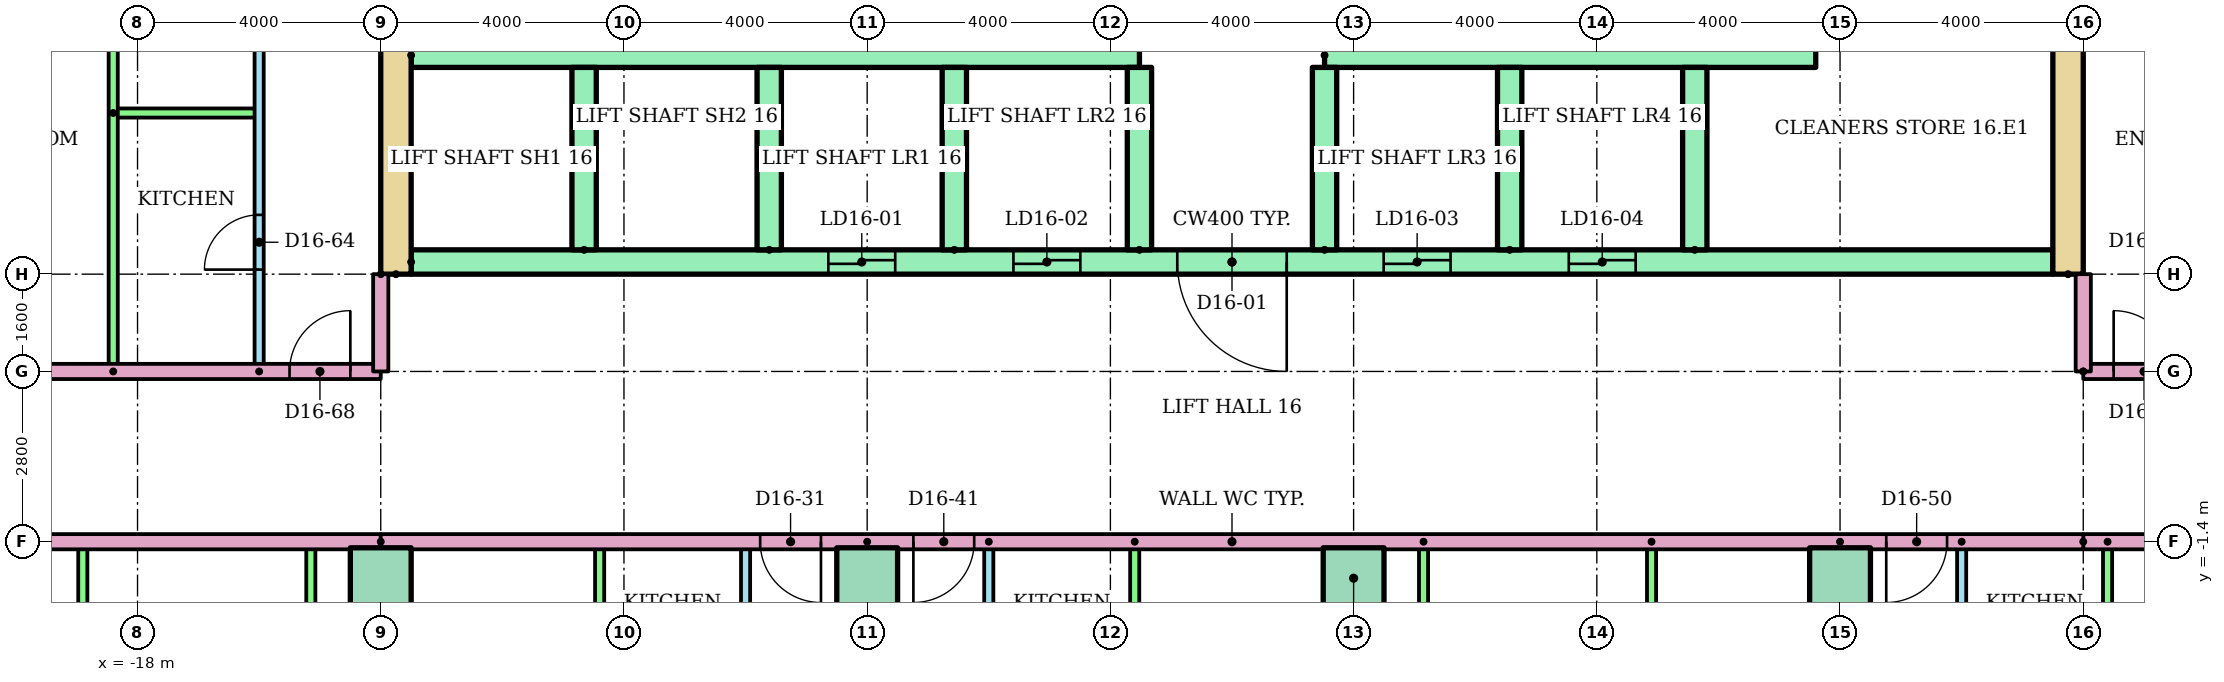
"""IFC4 building model, lengths in metres.
Left out: names, types, materials, properties, quantities, classifications, styles, units other than length and angle.
Written with IfcOpenShell. Run it as: python <this file> out.ifc"""

import sys

from ifc_helpers import new_model, si_unit, direction, frame, frame_2d, origin, origin_2d, place, context, subcontext, project, spatial, rectangle, extrude, element, fill, save


model = new_model("IFC4")
c1 = context("Model", 3, precision=1e-05, world=origin(), true_north=direction((0.0, 1.0)))
c2 = subcontext(c1, "Body", "Model", "MODEL_VIEW")
j1 = project(units=[si_unit("LENGTHUNIT", "METRE"), si_unit("PLANEANGLEUNIT", "RADIAN")], contexts=[c1])
p1 = place(None, origin())
s1 = spatial("IfcSite", under=j1, at=p1, CompositionType="ELEMENT")
p2 = place(p1, origin())
s2 = spatial("IfcBuilding", under=s1, at=p2, CompositionType="ELEMENT")
p3 = place(p2, frame((0.0, 0.0, 60.8)))
s3 = spatial("IfcBuildingStorey", under=s2, at=p3, CompositionType="ELEMENT", Elevation=60.8)
for number, where in (
    (1, (-14.0, -2.0, 0.0)),
    (2, (-6.0, -2.0, 0.0)),
    (3, (2.0, -2.0, 0.0)),
    (4, (10.0, -2.0, 0.0)),
):
    element("IfcColumn", number, at=place(p3, frame(where)), inside=s3, PredefinedType="COLUMN", context=c2, shape_type="SweptSolid", body=[
        extrude(rectangle(XDim=1.0, YDim=1.0, at=origin_2d()), origin(), (0.0, 0.0, 1.0), 3.2),
    ])
for number, where, z_axis, x_axis in (
    (5, (-13.75, 3.0, 0.0), (0.0, 0.0, 1.0), (0.0, 1.0, 0.0)),
    (6, (13.75, 3.0, 0.0), (0.0, 0.0, 1.0), (0.0, 1.0, 0.0)),
):
    element("IfcWall", number, at=place(p3, frame(where, z_axis=z_axis, x_axis=x_axis)), inside=s3, PredefinedType="SHEAR", context=c2, shape_type="SweptSolid", body=[
        extrude(rectangle(XDim=17.0, YDim=0.5, at=frame_2d((8.5, 0.0))), origin(), (0.0, 0.0, 1.0), 2.8),
    ])
p4 = place(p3, frame((-13.5, 3.2, 0.0)))
e7 = element("IfcWall", 7, at=p4, inside=s3, PredefinedType="SHEAR", context=c2, shape_type="SweptSolid", body=[
    extrude(rectangle(XDim=27.0, YDim=0.4, at=frame_2d((13.5, 0.0))), origin(), (0.0, 0.0, 1.0), 2.8),
])
p5 = place(p4, frame((6.861, 0.0, 0.0)))
e8 = element("IfcOpeningElement", 8, at=p5, cuts=e7, PredefinedType="OPENING", context=c2, shape_type="SweptSolid", body=[
    extrude(rectangle(XDim=1.1, YDim=2.1, at=frame_2d((0.55, 1.05))), frame((0.0, 0.21, 0.0), z_axis=(0.0, -1.0, 0.0), x_axis=(1.0, 0.0, 0.0)), (0.0, 0.0, 1.0), 0.42),
])
p6 = place(p4, frame((9.906, 0.0, 0.0)))
e9 = element("IfcOpeningElement", 9, at=p6, cuts=e7, PredefinedType="OPENING", context=c2, shape_type="SweptSolid", body=[
    extrude(rectangle(XDim=1.1, YDim=2.1, at=frame_2d((0.55, 1.05))), frame((0.0, 0.21, 0.0), z_axis=(0.0, -1.0, 0.0), x_axis=(1.0, 0.0, 0.0)), (0.0, 0.0, 1.0), 0.42),
])
p7 = place(p4, frame((15.994, 0.0, 0.0)))
e10 = element("IfcOpeningElement", 10, at=p7, cuts=e7, PredefinedType="OPENING", context=c2, shape_type="SweptSolid", body=[
    extrude(rectangle(XDim=1.1, YDim=2.1, at=frame_2d((0.55, 1.05))), frame((0.0, 0.21, 0.0), z_axis=(0.0, -1.0, 0.0), x_axis=(1.0, 0.0, 0.0)), (0.0, 0.0, 1.0), 0.42),
])
p8 = place(p4, frame((19.039, 0.0, 0.0)))
e11 = element("IfcOpeningElement", 11, at=p8, cuts=e7, PredefinedType="OPENING", context=c2, shape_type="SweptSolid", body=[
    extrude(rectangle(XDim=1.1, YDim=2.1, at=frame_2d((0.55, 1.05))), frame((0.0, 0.21, 0.0), z_axis=(0.0, -1.0, 0.0), x_axis=(1.0, 0.0, 0.0)), (0.0, 0.0, 1.0), 0.42),
])
p9 = place(p4, frame((12.6, 0.0, 0.0)))
e12 = element("IfcOpeningElement", 12, at=p9, cuts=e7, PredefinedType="OPENING", context=c2, shape_type="SweptSolid", body=[
    extrude(rectangle(XDim=1.8, YDim=2.1, at=frame_2d((0.9, 1.05))), frame((0.0, 0.21, 0.0), z_axis=(0.0, -1.0, 0.0), x_axis=(1.0, 0.0, 0.0)), (0.0, 0.0, 1.0), 0.42),
])
p10 = place(p3, frame((-13.5, 6.6, 0.0)))
e13 = element("IfcWall", 13, at=p10, inside=s3, PredefinedType="SHEAR", context=c2, shape_type="SweptSolid", body=[
    extrude(rectangle(XDim=11.978, YDim=0.4, at=frame_2d((5.989, 0.0))), origin(), (0.0, 0.0, 1.0), 2.8),
])
p11 = place(p3, frame((1.522, 6.6, 0.0)))
e14 = element("IfcWall", 14, at=p11, inside=s3, PredefinedType="SHEAR", context=c2, shape_type="SweptSolid", body=[
    extrude(rectangle(XDim=8.078, YDim=0.4, at=frame_2d((4.039, 0.0))), origin(), (0.0, 0.0, 1.0), 2.8),
])
for number, where, z_axis, x_axis in (
    (15, (-10.656, 3.4, 0.0), (0.0, 0.0, 1.0), (0.0, 1.0, 0.0)),
    (16, (-7.611, 3.4, 0.0), (0.0, 0.0, 1.0), (0.0, 1.0, 0.0)),
    (17, (-4.567, 3.4, 0.0), (0.0, 0.0, 1.0), (0.0, 1.0, 0.0)),
    (18, (-1.522, 3.4, 0.0), (0.0, 0.0, 1.0), (0.0, 1.0, 0.0)),
    (19, (1.522, 3.4, 0.0), (0.0, 0.0, 1.0), (0.0, 1.0, 0.0)),
    (20, (4.567, 3.4, 0.0), (0.0, 0.0, 1.0), (0.0, 1.0, 0.0)),
    (21, (7.611, 3.4, 0.0), (0.0, 0.0, 1.0), (0.0, 1.0, 0.0)),
):
    element("IfcWall", number, at=place(p3, frame(where, z_axis=z_axis, x_axis=x_axis)), inside=s3, PredefinedType="SHEAR", context=c2, shape_type="SweptSolid", body=[
        extrude(rectangle(XDim=3.0, YDim=0.4, at=frame_2d((1.5, 0.0))), origin(), (0.0, 0.0, 1.0), 2.8),
    ])
p12 = place(p3, frame((-8.0, -6.6, 0.0), z_axis=(0.0, 0.0, 1.0), x_axis=(0.0, 1.0, 0.0)))
e22 = element("IfcWall", 22, at=p12, inside=s3, PredefinedType="PARTITIONING", context=c2, shape_type="SweptSolid", body=[
    extrude(rectangle(XDim=5.2, YDim=0.15, at=frame_2d((2.6, 0.0))), origin(), (0.0, 0.0, 1.0), 2.4),
])
p13 = place(p12, frame((2.94, 0.0, 0.0)))
e23 = element("IfcOpeningElement", 23, at=p13, cuts=e22, PredefinedType="OPENING", context=c2, shape_type="SweptSolid", body=[
    extrude(rectangle(XDim=0.9, YDim=2.1, at=frame_2d((0.45, 1.05))), frame((0.0, 0.085, 0.0), z_axis=(0.0, -1.0, 0.0), x_axis=(1.0, 0.0, 0.0)), (0.0, 0.0, 1.0), 0.17),
])
p14 = place(p12, frame((0.825, 0.0, 0.0)))
e24 = element("IfcOpeningElement", 24, at=p14, cuts=e22, PredefinedType="OPENING", context=c2, shape_type="SweptSolid", body=[
    extrude(rectangle(XDim=0.8, YDim=2.1, at=frame_2d((0.4, 1.05))), frame((0.0, 0.085, 0.0), z_axis=(0.0, -1.0, 0.0), x_axis=(1.0, 0.0, 0.0)), (0.0, 0.0, 1.0), 0.17),
])
for number, where, z_axis, x_axis in (
    (25, (-10.4, -6.6, 0.0), (0.0, 0.0, 1.0), (0.0, 1.0, 0.0)),
    (26, (-15.15, -6.6, 0.0), (0.0, 0.0, 1.0), (0.0, 1.0, 0.0)),
    (27, (-18.9, -6.6, 0.0), (0.0, 0.0, 1.0), (0.0, 1.0, 0.0)),
):
    element("IfcWall", number, at=place(p3, frame(where, z_axis=z_axis, x_axis=x_axis)), inside=s3, PredefinedType="PARTITIONING", context=c2, shape_type="SweptSolid", body=[
        extrude(rectangle(XDim=5.2, YDim=0.15, at=frame_2d((2.6, 0.0))), origin(), (0.0, 0.0, 1.0), 2.4),
    ])
p15 = place(p3, frame((-4.0, -1.4, 0.0), z_axis=(0.0, 0.0, 1.0), x_axis=(0.0, -1.0, 0.0)))
e28 = element("IfcWall", 28, at=p15, inside=s3, PredefinedType="PARTITIONING", context=c2, shape_type="SweptSolid", body=[
    extrude(rectangle(XDim=5.2, YDim=0.15, at=frame_2d((2.6, 0.0))), origin(), (0.0, 0.0, 1.0), 2.4),
])
p16 = place(p15, frame((1.36, 0.0, 0.0)))
e29 = element("IfcOpeningElement", 29, at=p16, cuts=e28, PredefinedType="OPENING", context=c2, shape_type="SweptSolid", body=[
    extrude(rectangle(XDim=0.9, YDim=2.1, at=frame_2d((0.45, 1.05))), frame((0.0, 0.085, 0.0), z_axis=(0.0, -1.0, 0.0), x_axis=(1.0, 0.0, 0.0)), (0.0, 0.0, 1.0), 0.17),
])
p17 = place(p15, frame((3.575, 0.0, 0.0)))
e30 = element("IfcOpeningElement", 30, at=p17, cuts=e28, PredefinedType="OPENING", context=c2, shape_type="SweptSolid", body=[
    extrude(rectangle(XDim=0.8, YDim=2.1, at=frame_2d((0.4, 1.05))), frame((0.0, 0.085, 0.0), z_axis=(0.0, -1.0, 0.0), x_axis=(1.0, 0.0, 0.0)), (0.0, 0.0, 1.0), 0.17),
])
for number, where, z_axis, x_axis in (
    (31, (-1.6, -1.4, 0.0), (0.0, 0.0, 1.0), (0.0, -1.0, 0.0)),
    (32, (3.15, -1.4, 0.0), (0.0, 0.0, 1.0), (0.0, -1.0, 0.0)),
    (33, (6.9, -1.4, 0.0), (0.0, 0.0, 1.0), (0.0, -1.0, 0.0)),
):
    element("IfcWall", number, at=place(p3, frame(where, z_axis=z_axis, x_axis=x_axis)), inside=s3, PredefinedType="PARTITIONING", context=c2, shape_type="SweptSolid", body=[
        extrude(rectangle(XDim=5.2, YDim=0.15, at=frame_2d((2.6, 0.0))), origin(), (0.0, 0.0, 1.0), 2.4),
    ])
p18 = place(p3, frame((-6.0, -1.4, 0.0), z_axis=(0.0, 0.0, 1.0), x_axis=(0.0, -1.0, 0.0)))
e34 = element("IfcWall", 34, at=p18, inside=s3, PredefinedType="PARTITIONING", context=c2, shape_type="SweptSolid", body=[
    extrude(rectangle(XDim=14.71, YDim=0.25, at=frame_2d((7.355, 0.0))), origin(), (0.0, 0.0, 1.0), 2.4),
])
p19 = place(p3, frame((12.0, -1.4, 0.0), z_axis=(0.0, 0.0, 1.0), x_axis=(0.0, -1.0, 0.0)))
e35 = element("IfcWall", 35, at=p19, inside=s3, PredefinedType="PARTITIONING", context=c2, shape_type="SweptSolid", body=[
    extrude(rectangle(XDim=5.2, YDim=0.15, at=frame_2d((2.6, 0.0))), origin(), (0.0, 0.0, 1.0), 2.4),
])
p20 = place(p19, frame((1.36, 0.0, 0.0)))
e36 = element("IfcOpeningElement", 36, at=p20, cuts=e35, PredefinedType="OPENING", context=c2, shape_type="SweptSolid", body=[
    extrude(rectangle(XDim=0.9, YDim=2.1, at=frame_2d((0.45, 1.05))), frame((0.0, 0.085, 0.0), z_axis=(0.0, -1.0, 0.0), x_axis=(1.0, 0.0, 0.0)), (0.0, 0.0, 1.0), 0.17),
])
p21 = place(p19, frame((3.575, 0.0, 0.0)))
e37 = element("IfcOpeningElement", 37, at=p21, cuts=e35, PredefinedType="OPENING", context=c2, shape_type="SweptSolid", body=[
    extrude(rectangle(XDim=0.8, YDim=2.1, at=frame_2d((0.4, 1.05))), frame((0.0, 0.085, 0.0), z_axis=(0.0, -1.0, 0.0), x_axis=(1.0, 0.0, 0.0)), (0.0, 0.0, 1.0), 0.17),
])
p22 = place(p3, frame((14.4, -1.4, 0.0), z_axis=(0.0, 0.0, 1.0), x_axis=(0.0, -1.0, 0.0)))
e38 = element("IfcWall", 38, at=p22, inside=s3, PredefinedType="PARTITIONING", context=c2, shape_type="SweptSolid", body=[
    extrude(rectangle(XDim=5.2, YDim=0.15, at=frame_2d((2.6, 0.0))), origin(), (0.0, 0.0, 1.0), 2.4),
])
p23 = place(p3, frame((10.0, -1.4, 0.0), z_axis=(0.0, 0.0, 1.0), x_axis=(0.0, -1.0, 0.0)))
e39 = element("IfcWall", 39, at=p23, inside=s3, PredefinedType="PARTITIONING", context=c2, shape_type="SweptSolid", body=[
    extrude(rectangle(XDim=14.71, YDim=0.25, at=frame_2d((7.355, 0.0))), origin(), (0.0, 0.0, 1.0), 2.4),
])
p24 = place(p3, frame((-14.0, -1.4, 0.0), z_axis=(0.0, 0.0, 1.0), x_axis=(-1.0, 0.0, 0.0)))
e40 = element("IfcWall", 40, at=p24, inside=s3, PredefinedType="PARTITIONING", context=c2, shape_type="SweptSolid", body=[
    extrude(rectangle(XDim=15.0, YDim=0.25, at=frame_2d((7.5, 0.0))), origin(), (0.0, 0.0, 1.0), 2.4),
])
p25 = place(p24, frame((8.76, 0.0, 0.0)))
e41 = element("IfcOpeningElement", 41, at=p25, cuts=e40, PredefinedType="OPENING", context=c2, shape_type="SweptSolid", body=[
    extrude(rectangle(XDim=1.0, YDim=2.1, at=frame_2d((0.5, 1.05))), frame((0.0, 0.135, 0.0), z_axis=(0.0, -1.0, 0.0), x_axis=(1.0, 0.0, 0.0)), (0.0, 0.0, 1.0), 0.27),
])
p26 = place(p3, frame((29.0, -1.4, 0.0), z_axis=(0.0, 0.0, 1.0), x_axis=(-1.0, 0.0, 0.0)))
e42 = element("IfcWall", 42, at=p26, inside=s3, PredefinedType="PARTITIONING", context=c2, shape_type="SweptSolid", body=[
    extrude(rectangle(XDim=15.0, YDim=0.25, at=frame_2d((7.5, 0.0))), origin(), (0.0, 0.0, 1.0), 2.4),
])
p27 = place(p26, frame((1.24, 0.0, 0.0)))
e43 = element("IfcOpeningElement", 43, at=p27, cuts=e42, PredefinedType="OPENING", context=c2, shape_type="SweptSolid", body=[
    extrude(rectangle(XDim=1.0, YDim=2.1, at=frame_2d((0.5, 1.05))), frame((0.0, 0.135, 0.0), z_axis=(0.0, -1.0, 0.0), x_axis=(1.0, 0.0, 0.0)), (0.0, 0.0, 1.0), 0.27),
])
p28 = place(p3, frame((-16.0, 1.4, 0.0), z_axis=(0.0, 0.0, 1.0), x_axis=(0.0, 1.0, 0.0)))
e44 = element("IfcWall", 44, at=p28, inside=s3, PredefinedType="PARTITIONING", context=c2, shape_type="SweptSolid", body=[
    extrude(rectangle(XDim=7.6, YDim=0.15, at=frame_2d((3.8, 0.0))), origin(), (0.0, 0.0, 1.0), 2.4),
])
p29 = place(p28, frame((1.675, 0.0, 0.0)))
e45 = element("IfcOpeningElement", 45, at=p29, cuts=e44, PredefinedType="OPENING", context=c2, shape_type="SweptSolid", body=[
    extrude(rectangle(XDim=0.9, YDim=2.1, at=frame_2d((0.45, 1.05))), frame((0.0, 0.085, 0.0), z_axis=(0.0, -1.0, 0.0), x_axis=(1.0, 0.0, 0.0)), (0.0, 0.0, 1.0), 0.17),
])
p30 = place(p28, frame((5.525, 0.0, 0.0)))
e46 = element("IfcOpeningElement", 46, at=p30, cuts=e44, PredefinedType="OPENING", context=c2, shape_type="SweptSolid", body=[
    extrude(rectangle(XDim=0.8, YDim=2.1, at=frame_2d((0.4, 1.05))), frame((0.0, 0.085, 0.0), z_axis=(0.0, -1.0, 0.0), x_axis=(1.0, 0.0, 0.0)), (0.0, 0.0, 1.0), 0.17),
])
p31 = place(p3, frame((-18.4, 5.65, 0.0)))
e47 = element("IfcWall", 47, at=p31, inside=s3, PredefinedType="PARTITIONING", context=c2, shape_type="SweptSolid", body=[
    extrude(rectangle(XDim=2.4, YDim=0.15, at=frame_2d((1.2, 0.0))), origin(), (0.0, 0.0, 1.0), 2.4),
])
p32 = place(p3, frame((-18.4, 1.4, 0.0), z_axis=(0.0, 0.0, 1.0), x_axis=(0.0, 1.0, 0.0)))
e48 = element("IfcWall", 48, at=p32, inside=s3, PredefinedType="PARTITIONING", context=c2, shape_type="SweptSolid", body=[
    extrude(rectangle(XDim=7.6, YDim=0.15, at=frame_2d((3.8, 0.0))), origin(), (0.0, 0.0, 1.0), 2.4),
])
p33 = place(p3, frame((-29.0, 1.4, 0.0)))
e49 = element("IfcWall", 49, at=p33, inside=s3, PredefinedType="PARTITIONING", context=c2, shape_type="SweptSolid", body=[
    extrude(rectangle(XDim=15.0, YDim=0.25, at=frame_2d((7.5, 0.0))), origin(), (0.0, 0.0, 1.0), 2.4),
])
p34 = place(p33, frame((5.24, 0.0, 0.0)))
e50 = element("IfcOpeningElement", 50, at=p34, cuts=e49, PredefinedType="OPENING", context=c2, shape_type="SweptSolid", body=[
    extrude(rectangle(XDim=1.0, YDim=2.1, at=frame_2d((0.5, 1.05))), frame((0.0, 0.135, 0.0), z_axis=(0.0, -1.0, 0.0), x_axis=(1.0, 0.0, 0.0)), (0.0, 0.0, 1.0), 0.27),
])
p35 = place(p33, frame((13.5, 0.0, 0.0)))
e51 = element("IfcOpeningElement", 51, at=p35, cuts=e49, PredefinedType="OPENING", context=c2, shape_type="SweptSolid", body=[
    extrude(rectangle(XDim=1.0, YDim=2.1, at=frame_2d((0.5, 1.05))), frame((0.0, 0.135, 0.0), z_axis=(0.0, -1.0, 0.0), x_axis=(1.0, 0.0, 0.0)), (0.0, 0.0, 1.0), 0.27),
])
p36 = place(p3, frame((14.0, 1.4, 0.0)))
e52 = element("IfcWall", 52, at=p36, inside=s3, PredefinedType="PARTITIONING", context=c2, shape_type="SweptSolid", body=[
    extrude(rectangle(XDim=15.0, YDim=0.25, at=frame_2d((7.5, 0.0))), origin(), (0.0, 0.0, 1.0), 2.4),
])
p37 = place(p36, frame((0.5, 0.0, 0.0)))
e53 = element("IfcOpeningElement", 53, at=p37, cuts=e52, PredefinedType="OPENING", context=c2, shape_type="SweptSolid", body=[
    extrude(rectangle(XDim=1.0, YDim=2.1, at=frame_2d((0.5, 1.05))), frame((0.0, 0.135, 0.0), z_axis=(0.0, -1.0, 0.0), x_axis=(1.0, 0.0, 0.0)), (0.0, 0.0, 1.0), 0.27),
])
p38 = place(p3, frame((14.0, -1.4, 0.0), z_axis=(0.0, 0.0, 1.0), x_axis=(-1.0, 0.0, 0.0)))
e54 = element("IfcWall", 54, at=p38, inside=s3, PredefinedType="PARTITIONING", context=c2, shape_type="SweptSolid", body=[
    extrude(rectangle(XDim=28.0, YDim=0.25, at=frame_2d((14.0, 0.0))), origin(), (0.0, 0.0, 1.0), 2.4),
])
p39 = place(p38, frame((20.76, 0.0, 0.0)))
e55 = element("IfcOpeningElement", 55, at=p39, cuts=e54, PredefinedType="OPENING", context=c2, shape_type="SweptSolid", body=[
    extrude(rectangle(XDim=1.0, YDim=2.1, at=frame_2d((0.5, 1.05))), frame((0.0, 0.135, 0.0), z_axis=(0.0, -1.0, 0.0), x_axis=(1.0, 0.0, 0.0)), (0.0, 0.0, 1.0), 0.27),
])
p40 = place(p38, frame((18.24, 0.0, 0.0)))
e56 = element("IfcOpeningElement", 56, at=p40, cuts=e54, PredefinedType="OPENING", context=c2, shape_type="SweptSolid", body=[
    extrude(rectangle(XDim=1.0, YDim=2.1, at=frame_2d((0.5, 1.05))), frame((0.0, 0.135, 0.0), z_axis=(0.0, -1.0, 0.0), x_axis=(1.0, 0.0, 0.0)), (0.0, 0.0, 1.0), 0.27),
])
p41 = place(p38, frame((2.24, 0.0, 0.0)))
e57 = element("IfcOpeningElement", 57, at=p41, cuts=e54, PredefinedType="OPENING", context=c2, shape_type="SweptSolid", body=[
    extrude(rectangle(XDim=1.0, YDim=2.1, at=frame_2d((0.5, 1.05))), frame((0.0, 0.135, 0.0), z_axis=(0.0, -1.0, 0.0), x_axis=(1.0, 0.0, 0.0)), (0.0, 0.0, 1.0), 0.27),
])
for number, where, z_axis, x_axis in (
    (58, (-14.0, 3.0, 0.0), (0.0, 0.0, 1.0), (0.0, -1.0, 0.0)),
    (59, (14.0, 1.4, 0.0), (0.0, 0.0, 1.0), (0.0, 1.0, 0.0)),
):
    element("IfcWall", number, at=place(p3, frame(where, z_axis=z_axis, x_axis=x_axis)), inside=s3, PredefinedType="PARTITIONING", context=c2, shape_type="SweptSolid", body=[
        extrude(rectangle(XDim=1.6, YDim=0.25, at=frame_2d((0.8, 0.0))), origin(), (0.0, 0.0, 1.0), 2.4),
    ])
p42 = place(p5, origin())
e60 = element("IfcDoor", 60, at=p42, inside=s3, OperationType="SLIDING_TO_LEFT", PredefinedType="DOOR", context=c2, shape_type="SweptSolid", body=[
    extrude(rectangle(XDim=1.1, YDim=2.1, at=frame_2d((0.55, 1.05))), frame((0.0, 0.025, 0.0), z_axis=(0.0, -1.0, 0.0), x_axis=(1.0, 0.0, 0.0)), (0.0, 0.0, 1.0), 0.05),
])
fill(e8, e60)
p43 = place(p6, origin())
e61 = element("IfcDoor", 61, at=p43, inside=s3, OperationType="SLIDING_TO_LEFT", PredefinedType="DOOR", context=c2, shape_type="SweptSolid", body=[
    extrude(rectangle(XDim=1.1, YDim=2.1, at=frame_2d((0.55, 1.05))), frame((0.0, 0.025, 0.0), z_axis=(0.0, -1.0, 0.0), x_axis=(1.0, 0.0, 0.0)), (0.0, 0.0, 1.0), 0.05),
])
fill(e9, e61)
p44 = place(p7, origin())
e62 = element("IfcDoor", 62, at=p44, inside=s3, OperationType="SLIDING_TO_LEFT", PredefinedType="DOOR", context=c2, shape_type="SweptSolid", body=[
    extrude(rectangle(XDim=1.1, YDim=2.1, at=frame_2d((0.55, 1.05))), frame((0.0, 0.025, 0.0), z_axis=(0.0, -1.0, 0.0), x_axis=(1.0, 0.0, 0.0)), (0.0, 0.0, 1.0), 0.05),
])
fill(e10, e62)
p45 = place(p8, origin())
e63 = element("IfcDoor", 63, at=p45, inside=s3, OperationType="SLIDING_TO_LEFT", PredefinedType="DOOR", context=c2, shape_type="SweptSolid", body=[
    extrude(rectangle(XDim=1.1, YDim=2.1, at=frame_2d((0.55, 1.05))), frame((0.0, 0.025, 0.0), z_axis=(0.0, -1.0, 0.0), x_axis=(1.0, 0.0, 0.0)), (0.0, 0.0, 1.0), 0.05),
])
fill(e11, e63)
p46 = place(p9, frame((1.8, 0.0, 0.0), z_axis=(0.0, 0.0, 1.0), x_axis=(-1.0, 0.0, 0.0)))
e64 = element("IfcDoor", 64, at=p46, inside=s3, OperationType="DOUBLE_DOOR_SINGLE_SWING", PredefinedType="DOOR", context=c2, shape_type="SweptSolid", body=[
    extrude(rectangle(XDim=1.8, YDim=2.1, at=frame_2d((0.9, 1.05))), frame((0.0, 0.025, 0.0), z_axis=(0.0, -1.0, 0.0), x_axis=(1.0, 0.0, 0.0)), (0.0, 0.0, 1.0), 0.05),
])
fill(e12, e64)
p47 = place(p39, origin())
e65 = element("IfcDoor", 65, at=p47, inside=s3, OperationType="SINGLE_SWING_LEFT", PredefinedType="DOOR", context=c2, shape_type="SweptSolid", body=[
    extrude(rectangle(XDim=1.0, YDim=2.1, at=frame_2d((0.5, 1.05))), frame((0.0, 0.025, 0.0), z_axis=(0.0, -1.0, 0.0), x_axis=(1.0, 0.0, 0.0)), (0.0, 0.0, 1.0), 0.05),
])
fill(e55, e65)
p48 = place(p40, origin())
e66 = element("IfcDoor", 66, at=p48, inside=s3, OperationType="SINGLE_SWING_RIGHT", PredefinedType="DOOR", context=c2, shape_type="SweptSolid", body=[
    extrude(rectangle(XDim=1.0, YDim=2.1, at=frame_2d((0.5, 1.05))), frame((0.0, 0.025, 0.0), z_axis=(0.0, -1.0, 0.0), x_axis=(1.0, 0.0, 0.0)), (0.0, 0.0, 1.0), 0.05),
])
fill(e56, e66)
p49 = place(p41, origin())
e67 = element("IfcDoor", 67, at=p49, inside=s3, OperationType="SINGLE_SWING_RIGHT", PredefinedType="DOOR", context=c2, shape_type="SweptSolid", body=[
    extrude(rectangle(XDim=1.0, YDim=2.1, at=frame_2d((0.5, 1.05))), frame((0.0, 0.025, 0.0), z_axis=(0.0, -1.0, 0.0), x_axis=(1.0, 0.0, 0.0)), (0.0, 0.0, 1.0), 0.05),
])
fill(e57, e67)
p50 = place(p29, origin())
e68 = element("IfcDoor", 68, at=p50, inside=s3, OperationType="SINGLE_SWING_LEFT", PredefinedType="DOOR", context=c2, shape_type="SweptSolid", body=[
    extrude(rectangle(XDim=0.9, YDim=2.1, at=frame_2d((0.45, 1.05))), frame((0.0, 0.025, 0.0), z_axis=(0.0, -1.0, 0.0), x_axis=(1.0, 0.0, 0.0)), (0.0, 0.0, 1.0), 0.05),
])
fill(e45, e68)
p51 = place(p35, origin())
e69 = element("IfcDoor", 69, at=p51, inside=s3, OperationType="SINGLE_SWING_RIGHT", PredefinedType="DOOR", context=c2, shape_type="SweptSolid", body=[
    extrude(rectangle(XDim=1.0, YDim=2.1, at=frame_2d((0.5, 1.05))), frame((0.0, 0.025, 0.0), z_axis=(0.0, -1.0, 0.0), x_axis=(1.0, 0.0, 0.0)), (0.0, 0.0, 1.0), 0.05),
])
fill(e51, e69)
p52 = place(p37, origin())
e70 = element("IfcDoor", 70, at=p52, inside=s3, OperationType="SINGLE_SWING_LEFT", PredefinedType="DOOR", context=c2, shape_type="SweptSolid", body=[
    extrude(rectangle(XDim=1.0, YDim=2.1, at=frame_2d((0.5, 1.05))), frame((0.0, 0.025, 0.0), z_axis=(0.0, -1.0, 0.0), x_axis=(1.0, 0.0, 0.0)), (0.0, 0.0, 1.0), 0.05),
])
fill(e53, e70)
save(model, sys.argv[1])
